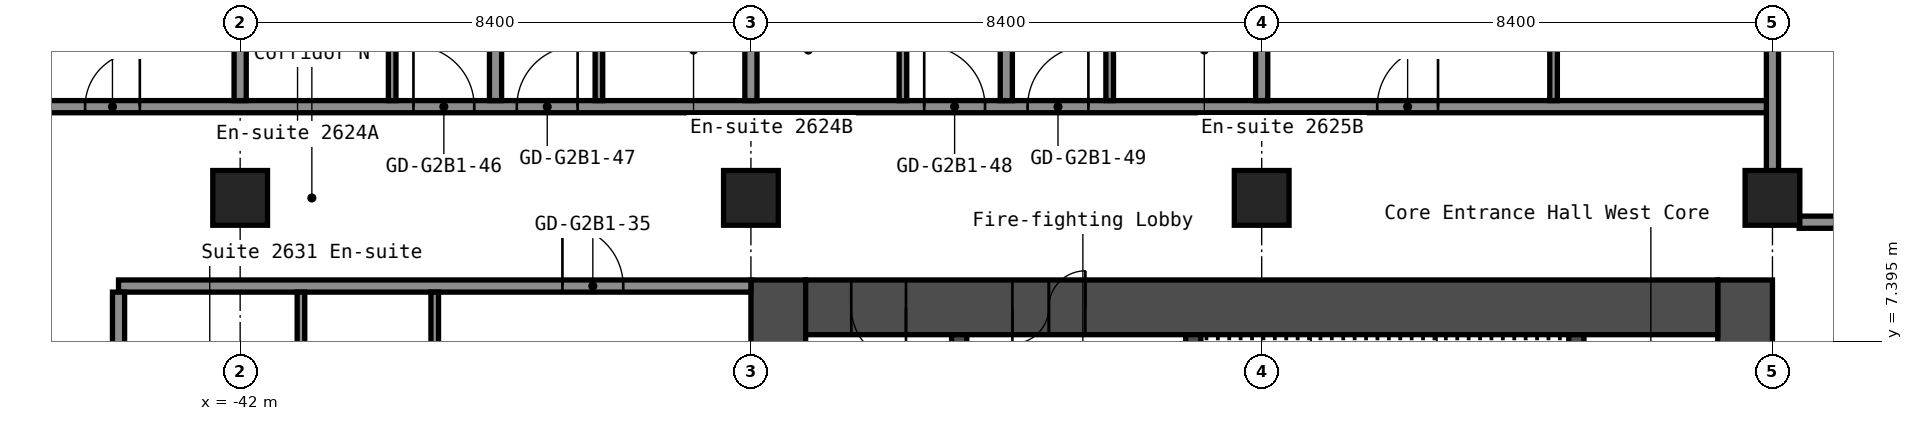
"""IFC4 building model, lengths in metres.
Left out: names, types, materials, properties, quantities, classifications, styles, units other than length and angle.
Written with IfcOpenShell. Run it as: python <this file> out.ifc"""

import sys

from ifc_helpers import new_model, si_unit, direction, frame, frame_2d, origin, origin_2d, place, context, subcontext, project, spatial, rectangle, hollow_rectangle, extrude, element, fill, save


model = new_model("IFC4")
c1 = context("Model", 3, precision=1e-05, world=origin(), true_north=direction((0.0, 1.0)))
c2 = subcontext(c1, "Body", "Model", "MODEL_VIEW")
j1 = project(units=[si_unit("LENGTHUNIT", "METRE"), si_unit("PLANEANGLEUNIT", "RADIAN")], contexts=[c1])
p1 = place(None, origin())
s1 = spatial("IfcSite", under=j1, at=p1, CompositionType="ELEMENT")
p2 = place(p1, origin())
s2 = spatial("IfcBuilding", under=s1, at=p2, CompositionType="ELEMENT")
p3 = place(p2, frame((0.0, 0.0, 94.6)))
s3 = spatial("IfcBuildingStorey", under=s2, at=p3, CompositionType="ELEMENT", Elevation=94.6)
for number, where, z_axis, x_axis in (
    (1, (-42.0, 9.75, 0.0), (0.0, 0.0, 1.0), (1.0, 0.0, 0.0)),
    (2, (-33.6, 9.75, 0.0), (0.0, 0.0, 1.0), (1.0, 0.0, 0.0)),
    (3, (-25.2, 9.75, 0.0), (0.0, 0.0, 1.0), (1.0, 0.0, 0.0)),
    (4, (-16.8, 9.75, 0.0), (0.0, 0.0, 1.0), (1.0, 0.0, 0.0)),
):
    element("IfcColumn", number, at=place(p3, frame(where, z_axis=z_axis, x_axis=x_axis)), inside=s3, PredefinedType="COLUMN", context=c2, shape_type="SweptSolid", body=[
        extrude(hollow_rectangle(XDim=0.9, YDim=0.9, WallThickness=0.036, at=origin_2d()), origin(), (0.0, 0.0, 1.0), 2.8),
    ])
p4 = place(p3, frame((-17.25, -8.4, 0.0), z_axis=(0.0, 0.0, 1.0), x_axis=(0.0, 1.0, 0.0)))
e5 = element("IfcWall", 5, at=p4, inside=s3, PredefinedType="SHEAR", context=c2, shape_type="SweptSolid", body=[
    extrude(rectangle(XDim=16.8, YDim=0.9, at=frame_2d((8.4, 0.0))), origin(), (0.0, 0.0, 1.0), 2.8),
])
p5 = place(p4, frame((7.6, 0.0, 0.0)))
e6 = element("IfcOpeningElement", 6, at=p5, cuts=e5, PredefinedType="OPENING", context=c2, shape_type="SweptSolid", body=[
    extrude(rectangle(XDim=1.2, YDim=2.1, at=frame_2d((0.6, 1.05))), frame((0.0, 0.46, 0.0), z_axis=(0.0, -1.0, 0.0), x_axis=(1.0, 0.0, 0.0)), (0.0, 0.0, 1.0), 0.92),
])
p6 = place(p3, frame((-33.15, -8.4, 0.0), z_axis=(0.0, 0.0, 1.0), x_axis=(0.0, 1.0, 0.0)))
e7 = element("IfcWall", 7, at=p6, inside=s3, PredefinedType="SHEAR", context=c2, shape_type="SweptSolid", body=[
    extrude(rectangle(XDim=16.8, YDim=0.9, at=frame_2d((8.4, 0.0))), origin(), (0.0, 0.0, 1.0), 2.8),
])
p7 = place(p3, frame((-32.7, 7.95, 0.0), z_axis=(0.0, 0.0, 1.0), x_axis=(1.0, 0.0, 0.0)))
e8 = element("IfcWall", 8, at=p7, inside=s3, PredefinedType="SHEAR", context=c2, shape_type="SweptSolid", body=[
    extrude(rectangle(XDim=15.0, YDim=0.9, at=frame_2d((7.5, 0.0))), origin(), (0.0, 0.0, 1.0), 2.8),
])
p8 = place(p7, frame((3.4, 0.0, 0.0)))
e9 = element("IfcOpeningElement", 9, at=p8, cuts=e8, PredefinedType="OPENING", context=c2, shape_type="SweptSolid", body=[
    extrude(rectangle(XDim=1.2, YDim=2.1, at=frame_2d((0.6, 1.05))), frame((0.0, 0.46, 0.0), z_axis=(0.0, -1.0, 0.0), x_axis=(1.0, 0.0, 0.0)), (0.0, 0.0, 1.0), 0.92),
])
p9 = place(p7, frame((0.75, 0.0, 0.0)))
e10 = element("IfcOpeningElement", 10, at=p9, cuts=e8, PredefinedType="OPENING", context=c2, shape_type="SweptSolid", body=[
    extrude(rectangle(XDim=0.9, YDim=2.1, at=frame_2d((0.45, 1.05))), frame((0.0, 0.46, 0.0), z_axis=(0.0, -1.0, 0.0), x_axis=(1.0, 0.0, 0.0)), (0.0, 0.0, 1.0), 0.92),
])
p10 = place(p3, frame((-20.025, 1.2, 0.0), z_axis=(0.0, 0.0, 1.0), x_axis=(0.0, 1.0, 0.0)))
e11 = element("IfcWall", 11, at=p10, inside=s3, PredefinedType="SHEAR", context=c2, shape_type="SweptSolid", body=[
    extrude(rectangle(XDim=6.3, YDim=0.25, at=frame_2d((3.15, 0.0))), origin(), (0.0, 0.0, 1.0), 2.8),
])
p11 = place(p3, frame((-26.325, 3.75, 0.0), z_axis=(0.0, 0.0, 1.0), x_axis=(0.0, 1.0, 0.0)))
e12 = element("IfcWall", 12, at=p11, inside=s3, PredefinedType="SHEAR", context=c2, shape_type="SweptSolid", body=[
    extrude(rectangle(XDim=3.75, YDim=0.25, at=frame_2d((1.875, 0.0))), origin(), (0.0, 0.0, 1.0), 2.8),
])
p12 = place(p11, frame((1.25, 0.0, 0.0)))
e13 = element("IfcOpeningElement", 13, at=p12, cuts=e12, PredefinedType="OPENING", context=c2, shape_type="SweptSolid", body=[
    extrude(rectangle(XDim=1.2, YDim=2.1, at=frame_2d((0.6, 1.05))), frame((0.0, 0.135, 0.0), z_axis=(0.0, -1.0, 0.0), x_axis=(1.0, 0.0, 0.0)), (0.0, 0.0, 1.0), 0.27),
])
p13 = place(p3, frame((-30.175, 1.45, 0.0), z_axis=(0.0, 0.0, 1.0), x_axis=(0.0, 1.0, 0.0)))
e14 = element("IfcWall", 14, at=p13, inside=s3, PredefinedType="SHEAR", context=c2, shape_type="SweptSolid", body=[
    extrude(rectangle(XDim=6.05, YDim=0.25, at=frame_2d((3.025, 0.0))), origin(), (0.0, 0.0, 1.0), 2.8),
])
p14 = place(p13, frame((2.625, 0.0, 0.0)))
e15 = element("IfcOpeningElement", 15, at=p14, cuts=e14, PredefinedType="OPENING", context=c2, shape_type="SweptSolid", body=[
    extrude(rectangle(XDim=1.1, YDim=2.1, at=frame_2d((0.55, 1.05))), frame((0.0, 0.135, 0.0), z_axis=(0.0, -1.0, 0.0), x_axis=(1.0, 0.0, 0.0)), (0.0, 0.0, 1.0), 0.27),
])
p15 = place(p3, frame((-44.0, 8.3, 0.0), z_axis=(0.0, 0.0, 1.0), x_axis=(1.0, 0.0, 0.0)))
e16 = element("IfcWall", 16, at=p15, inside=s3, PredefinedType="PARTITIONING", context=c2, shape_type="SweptSolid", body=[
    extrude(rectangle(XDim=10.4, YDim=0.2, at=frame_2d((5.2, 0.0))), origin(), (0.0, 0.0, 1.0), 2.8),
])
p16 = place(p15, frame((7.3, 0.0, 0.0)))
e17 = element("IfcOpeningElement", 17, at=p16, cuts=e16, PredefinedType="OPENING", context=c2, shape_type="SweptSolid", body=[
    extrude(rectangle(XDim=1.0, YDim=2.1, at=frame_2d((0.5, 1.05))), frame((0.0, 0.11, 0.0), z_axis=(0.0, -1.0, 0.0), x_axis=(1.0, 0.0, 0.0)), (0.0, 0.0, 1.0), 0.22),
])
p17 = place(p3, frame((-16.36, 9.35, 0.0), z_axis=(0.0, 0.0, 1.0), x_axis=(1.0, 0.0, 0.0)))
e18 = element("IfcWall", 18, at=p17, inside=s3, PredefinedType="PARTITIONING", context=c2, shape_type="SweptSolid", body=[
    extrude(rectangle(XDim=32.72, YDim=0.2, at=frame_2d((16.36, 0.0))), origin(), (0.0, 0.0, 1.0), 2.8),
])
p18 = place(p17, frame((1.8, 0.0, 0.0)))
e19 = element("IfcOpeningElement", 19, at=p18, cuts=e18, PredefinedType="OPENING", context=c2, shape_type="SweptSolid", body=[
    extrude(rectangle(XDim=0.9, YDim=2.1, at=frame_2d((0.45, 1.05))), frame((0.0, 0.11, 0.0), z_axis=(0.0, -1.0, 0.0), x_axis=(1.0, 0.0, 0.0)), (0.0, 0.0, 1.0), 0.22),
])
p19 = place(p17, frame((6.0, 0.0, 0.0)))
e20 = element("IfcOpeningElement", 20, at=p19, cuts=e18, PredefinedType="OPENING", context=c2, shape_type="SweptSolid", body=[
    extrude(rectangle(XDim=0.9, YDim=2.1, at=frame_2d((0.45, 1.05))), frame((0.0, 0.11, 0.0), z_axis=(0.0, -1.0, 0.0), x_axis=(1.0, 0.0, 0.0)), (0.0, 0.0, 1.0), 0.22),
])
p20 = place(p17, frame((9.275, 0.0, 0.0)))
e21 = element("IfcOpeningElement", 21, at=p20, cuts=e18, PredefinedType="OPENING", context=c2, shape_type="SweptSolid", body=[
    extrude(rectangle(XDim=0.9, YDim=2.1, at=frame_2d((0.45, 1.05))), frame((0.0, 0.11, 0.0), z_axis=(0.0, -1.0, 0.0), x_axis=(1.0, 0.0, 0.0)), (0.0, 0.0, 1.0), 0.22),
])
p21 = place(p17, frame((13.475, 0.0, 0.0)))
e22 = element("IfcOpeningElement", 22, at=p21, cuts=e18, PredefinedType="OPENING", context=c2, shape_type="SweptSolid", body=[
    extrude(rectangle(XDim=0.9, YDim=2.1, at=frame_2d((0.45, 1.05))), frame((0.0, 0.11, 0.0), z_axis=(0.0, -1.0, 0.0), x_axis=(1.0, 0.0, 0.0)), (0.0, 0.0, 1.0), 0.22),
])
p22 = place(p17, frame((19.21, 0.0, 0.0)))
e23 = element("IfcOpeningElement", 23, at=p22, cuts=e18, PredefinedType="OPENING", context=c2, shape_type="SweptSolid", body=[
    extrude(rectangle(XDim=1.0, YDim=2.1, at=frame_2d((0.5, 1.05))), frame((0.0, 0.11, 0.0), z_axis=(0.0, -1.0, 0.0), x_axis=(1.0, 0.0, 0.0)), (0.0, 0.0, 1.0), 0.22),
])
p23 = place(p17, frame((20.91, 0.0, 0.0)))
e24 = element("IfcOpeningElement", 24, at=p23, cuts=e18, PredefinedType="OPENING", context=c2, shape_type="SweptSolid", body=[
    extrude(rectangle(XDim=1.0, YDim=2.1, at=frame_2d((0.5, 1.05))), frame((0.0, 0.11, 0.0), z_axis=(0.0, -1.0, 0.0), x_axis=(1.0, 0.0, 0.0)), (0.0, 0.0, 1.0), 0.22),
])
p24 = place(p17, frame((27.61, 0.0, 0.0)))
e25 = element("IfcOpeningElement", 25, at=p24, cuts=e18, PredefinedType="OPENING", context=c2, shape_type="SweptSolid", body=[
    extrude(rectangle(XDim=1.0, YDim=2.1, at=frame_2d((0.5, 1.05))), frame((0.0, 0.11, 0.0), z_axis=(0.0, -1.0, 0.0), x_axis=(1.0, 0.0, 0.0)), (0.0, 0.0, 1.0), 0.22),
])
p25 = place(p17, frame((29.31, 0.0, 0.0)))
e26 = element("IfcOpeningElement", 26, at=p25, cuts=e18, PredefinedType="OPENING", context=c2, shape_type="SweptSolid", body=[
    extrude(rectangle(XDim=1.0, YDim=2.1, at=frame_2d((0.5, 1.05))), frame((0.0, 0.11, 0.0), z_axis=(0.0, -1.0, 0.0), x_axis=(1.0, 0.0, 0.0)), (0.0, 0.0, 1.0), 0.22),
])
p26 = place(p3, frame((-46.5, 11.25, 0.0), z_axis=(0.0, 0.0, 1.0), x_axis=(1.0, 0.0, 0.0)))
e27 = element("IfcWall", 27, at=p26, inside=s3, PredefinedType="PARTITIONING", context=c2, shape_type="SweptSolid", body=[
    extrude(rectangle(XDim=29.7, YDim=0.2, at=frame_2d((14.85, 0.0))), origin(), (0.0, 0.0, 1.0), 2.8),
])
p27 = place(p26, frame((1.95, 0.0, 0.0)))
e28 = element("IfcOpeningElement", 28, at=p27, cuts=e27, PredefinedType="OPENING", context=c2, shape_type="SweptSolid", body=[
    extrude(rectangle(XDim=0.9, YDim=2.1, at=frame_2d((0.45, 1.05))), frame((0.0, 0.11, 0.0), z_axis=(0.0, -1.0, 0.0), x_axis=(1.0, 0.0, 0.0)), (0.0, 0.0, 1.0), 0.22),
])
p28 = place(p26, frame((7.35, 0.0, 0.0)))
e29 = element("IfcOpeningElement", 29, at=p28, cuts=e27, PredefinedType="OPENING", context=c2, shape_type="SweptSolid", body=[
    extrude(rectangle(XDim=1.0, YDim=2.1, at=frame_2d((0.5, 1.05))), frame((0.0, 0.11, 0.0), z_axis=(0.0, -1.0, 0.0), x_axis=(1.0, 0.0, 0.0)), (0.0, 0.0, 1.0), 0.22),
])
p29 = place(p26, frame((9.05, 0.0, 0.0)))
e30 = element("IfcOpeningElement", 30, at=p29, cuts=e27, PredefinedType="OPENING", context=c2, shape_type="SweptSolid", body=[
    extrude(rectangle(XDim=1.0, YDim=2.1, at=frame_2d((0.5, 1.05))), frame((0.0, 0.11, 0.0), z_axis=(0.0, -1.0, 0.0), x_axis=(1.0, 0.0, 0.0)), (0.0, 0.0, 1.0), 0.22),
])
p30 = place(p26, frame((15.75, 0.0, 0.0)))
e31 = element("IfcOpeningElement", 31, at=p30, cuts=e27, PredefinedType="OPENING", context=c2, shape_type="SweptSolid", body=[
    extrude(rectangle(XDim=1.0, YDim=2.1, at=frame_2d((0.5, 1.05))), frame((0.0, 0.11, 0.0), z_axis=(0.0, -1.0, 0.0), x_axis=(1.0, 0.0, 0.0)), (0.0, 0.0, 1.0), 0.22),
])
p31 = place(p26, frame((17.45, 0.0, 0.0)))
e32 = element("IfcOpeningElement", 32, at=p31, cuts=e27, PredefinedType="OPENING", context=c2, shape_type="SweptSolid", body=[
    extrude(rectangle(XDim=1.0, YDim=2.1, at=frame_2d((0.5, 1.05))), frame((0.0, 0.11, 0.0), z_axis=(0.0, -1.0, 0.0), x_axis=(1.0, 0.0, 0.0)), (0.0, 0.0, 1.0), 0.22),
])
p32 = place(p26, frame((23.2, 0.0, 0.0)))
e33 = element("IfcOpeningElement", 33, at=p32, cuts=e27, PredefinedType="OPENING", context=c2, shape_type="SweptSolid", body=[
    extrude(rectangle(XDim=1.0, YDim=2.1, at=frame_2d((0.5, 1.05))), frame((0.0, 0.11, 0.0), z_axis=(0.0, -1.0, 0.0), x_axis=(1.0, 0.0, 0.0)), (0.0, 0.0, 1.0), 0.22),
])
p33 = place(p3, frame((-44.0, -8.2, 0.0), z_axis=(0.0, 0.0, 1.0), x_axis=(0.0, 1.0, 0.0)))
e34 = element("IfcWall", 34, at=p33, inside=s3, PredefinedType="PARTITIONING", context=c2, shape_type="SweptSolid", body=[
    extrude(rectangle(XDim=16.4, YDim=0.2, at=frame_2d((8.2, 0.0))), origin(), (0.0, 0.0, 1.0), 2.8),
])
p34 = place(p3, frame((-42.0, 11.35, 0.0), z_axis=(0.0, 0.0, 1.0), x_axis=(0.0, 1.0, 0.0)))
e35 = element("IfcWall", 35, at=p34, inside=s3, PredefinedType="PARTITIONING", context=c2, shape_type="SweptSolid", body=[
    extrude(rectangle(XDim=12.2, YDim=0.2, at=frame_2d((6.1, 0.0))), origin(), (0.0, 0.0, 1.0), 2.8),
])
p35 = place(p3, frame((-41.0, 5.1, 0.0), z_axis=(0.0, 0.0, 1.0), x_axis=(0.0, 1.0, 0.0)))
e36 = element("IfcWall", 36, at=p35, inside=s3, PredefinedType="PARTITIONING", context=c2, shape_type="SweptSolid", body=[
    extrude(rectangle(XDim=3.1, YDim=0.125, at=frame_2d((1.55, 0.0))), origin(), (0.0, 0.0, 1.0), 2.8),
])
p36 = place(p3, frame((-39.5, 11.35, 0.0), z_axis=(0.0, 0.0, 1.0), x_axis=(0.0, 1.0, 0.0)))
e37 = element("IfcWall", 37, at=p36, inside=s3, PredefinedType="PARTITIONING", context=c2, shape_type="SweptSolid", body=[
    extrude(rectangle(XDim=2.9, YDim=0.125, at=frame_2d((1.45, 0.0))), origin(), (0.0, 0.0, 1.0), 2.8),
])
p37 = place(p36, frame((1.5, 0.0, 0.0)))
e38 = element("IfcOpeningElement", 38, at=p37, cuts=e37, PredefinedType="OPENING", context=c2, shape_type="SweptSolid", body=[
    extrude(rectangle(XDim=0.8, YDim=2.1, at=frame_2d((0.4, 1.05))), frame((0.0, 0.073, 0.0), z_axis=(0.0, -1.0, 0.0), x_axis=(1.0, 0.0, 0.0)), (0.0, 0.0, 1.0), 0.145),
])
p38 = place(p3, frame((-38.8, 0.1, 0.0), z_axis=(0.0, 0.0, 1.0), x_axis=(0.0, 1.0, 0.0)))
e39 = element("IfcWall", 39, at=p38, inside=s3, PredefinedType="PARTITIONING", context=c2, shape_type="SweptSolid", body=[
    extrude(rectangle(XDim=8.1, YDim=0.125, at=frame_2d((4.05, 0.0))), origin(), (0.0, 0.0, 1.0), 2.8),
])
p39 = place(p38, frame((3.15, 0.0, 0.0)))
e40 = element("IfcOpeningElement", 40, at=p39, cuts=e39, PredefinedType="OPENING", context=c2, shape_type="SweptSolid", body=[
    extrude(rectangle(XDim=0.9, YDim=2.1, at=frame_2d((0.45, 1.05))), frame((0.0, 0.073, 0.0), z_axis=(0.0, -1.0, 0.0), x_axis=(1.0, 0.0, 0.0)), (0.0, 0.0, 1.0), 0.145),
])
p40 = place(p3, frame((-37.8, 11.35, 0.0), z_axis=(0.0, 0.0, 1.0), x_axis=(0.0, 1.0, 0.0)))
e41 = element("IfcWall", 41, at=p40, inside=s3, PredefinedType="PARTITIONING", context=c2, shape_type="SweptSolid", body=[
    extrude(rectangle(XDim=12.2, YDim=0.2, at=frame_2d((6.1, 0.0))), origin(), (0.0, 0.0, 1.0), 2.8),
])
p41 = place(p3, frame((-36.1, 11.35, 0.0), z_axis=(0.0, 0.0, 1.0), x_axis=(0.0, 1.0, 0.0)))
e42 = element("IfcWall", 42, at=p41, inside=s3, PredefinedType="PARTITIONING", context=c2, shape_type="SweptSolid", body=[
    extrude(rectangle(XDim=2.9, YDim=0.125, at=frame_2d((1.45, 0.0))), origin(), (0.0, 0.0, 1.0), 2.8),
])
p42 = place(p41, frame((1.5, 0.0, 0.0)))
e43 = element("IfcOpeningElement", 43, at=p42, cuts=e42, PredefinedType="OPENING", context=c2, shape_type="SweptSolid", body=[
    extrude(rectangle(XDim=0.8, YDim=2.1, at=frame_2d((0.4, 1.05))), frame((0.0, 0.073, 0.0), z_axis=(0.0, -1.0, 0.0), x_axis=(1.0, 0.0, 0.0)), (0.0, 0.0, 1.0), 0.145),
])
p43 = place(p3, frame((-33.6, 11.35, 0.0), z_axis=(0.0, 0.0, 1.0), x_axis=(0.0, 1.0, 0.0)))
e44 = element("IfcWall", 44, at=p43, inside=s3, PredefinedType="PARTITIONING", context=c2, shape_type="SweptSolid", body=[
    extrude(rectangle(XDim=12.2, YDim=0.2, at=frame_2d((6.1, 0.0))), origin(), (0.0, 0.0, 1.0), 2.8),
])
p44 = place(p3, frame((-31.1, 11.35, 0.0), z_axis=(0.0, 0.0, 1.0), x_axis=(0.0, 1.0, 0.0)))
e45 = element("IfcWall", 45, at=p44, inside=s3, PredefinedType="PARTITIONING", context=c2, shape_type="SweptSolid", body=[
    extrude(rectangle(XDim=2.9, YDim=0.125, at=frame_2d((1.45, 0.0))), origin(), (0.0, 0.0, 1.0), 2.8),
])
p45 = place(p44, frame((1.5, 0.0, 0.0)))
e46 = element("IfcOpeningElement", 46, at=p45, cuts=e45, PredefinedType="OPENING", context=c2, shape_type="SweptSolid", body=[
    extrude(rectangle(XDim=0.8, YDim=2.1, at=frame_2d((0.4, 1.05))), frame((0.0, 0.073, 0.0), z_axis=(0.0, -1.0, 0.0), x_axis=(1.0, 0.0, 0.0)), (0.0, 0.0, 1.0), 0.145),
])
p46 = place(p3, frame((-29.4, 11.35, 0.0), z_axis=(0.0, 0.0, 1.0), x_axis=(0.0, 1.0, 0.0)))
e47 = element("IfcWall", 47, at=p46, inside=s3, PredefinedType="PARTITIONING", context=c2, shape_type="SweptSolid", body=[
    extrude(rectangle(XDim=12.2, YDim=0.2, at=frame_2d((6.1, 0.0))), origin(), (0.0, 0.0, 1.0), 2.8),
])
p47 = place(p3, frame((-27.7, 11.35, 0.0), z_axis=(0.0, 0.0, 1.0), x_axis=(0.0, 1.0, 0.0)))
e48 = element("IfcWall", 48, at=p47, inside=s3, PredefinedType="PARTITIONING", context=c2, shape_type="SweptSolid", body=[
    extrude(rectangle(XDim=2.9, YDim=0.125, at=frame_2d((1.45, 0.0))), origin(), (0.0, 0.0, 1.0), 2.8),
])
p48 = place(p47, frame((1.5, 0.0, 0.0)))
e49 = element("IfcOpeningElement", 49, at=p48, cuts=e48, PredefinedType="OPENING", context=c2, shape_type="SweptSolid", body=[
    extrude(rectangle(XDim=0.8, YDim=2.1, at=frame_2d((0.4, 1.05))), frame((0.0, 0.073, 0.0), z_axis=(0.0, -1.0, 0.0), x_axis=(1.0, 0.0, 0.0)), (0.0, 0.0, 1.0), 0.145),
])
p49 = place(p3, frame((-25.2, 11.35, 0.0), z_axis=(0.0, 0.0, 1.0), x_axis=(0.0, 1.0, 0.0)))
e50 = element("IfcWall", 50, at=p49, inside=s3, PredefinedType="PARTITIONING", context=c2, shape_type="SweptSolid", body=[
    extrude(rectangle(XDim=12.2, YDim=0.2, at=frame_2d((6.1, 0.0))), origin(), (0.0, 0.0, 1.0), 2.8),
])
p50 = place(p3, frame((-20.4, 11.35, 0.0), z_axis=(0.0, 0.0, 1.0), x_axis=(0.0, 1.0, 0.0)))
e51 = element("IfcWall", 51, at=p50, inside=s3, PredefinedType="PARTITIONING", context=c2, shape_type="SweptSolid", body=[
    extrude(rectangle(XDim=3.3, YDim=0.125, at=frame_2d((1.65, 0.0))), origin(), (0.0, 0.0, 1.0), 2.8),
])
p51 = place(p50, frame((1.1, 0.0, 0.0)))
e52 = element("IfcOpeningElement", 52, at=p51, cuts=e51, PredefinedType="OPENING", context=c2, shape_type="SweptSolid", body=[
    extrude(rectangle(XDim=1.0, YDim=2.1, at=frame_2d((0.5, 1.05))), frame((0.0, 0.073, 0.0), z_axis=(0.0, -1.0, 0.0), x_axis=(1.0, 0.0, 0.0)), (0.0, 0.0, 1.0), 0.145),
])
p52 = place(p3, frame((-16.8, 10.19, 0.0), z_axis=(0.0, 0.0, 1.0), x_axis=(0.0, 1.0, 0.0)))
e53 = element("IfcWall", 53, at=p52, inside=s3, PredefinedType="PARTITIONING", context=c2, shape_type="SweptSolid", body=[
    extrude(rectangle(XDim=13.36, YDim=0.2, at=frame_2d((6.68, 0.0))), origin(), (0.0, 0.0, 1.0), 2.8),
])
p53 = place(p8, origin())
e54 = element("IfcDoor", 54, at=p53, inside=s3, OperationType="DOUBLE_DOOR_SINGLE_SWING", PredefinedType="DOOR", context=c2, shape_type="SweptSolid", body=[
    extrude(rectangle(XDim=1.2, YDim=2.1, at=frame_2d((0.6, 1.05))), frame((0.0, 0.025, 0.0), z_axis=(0.0, -1.0, 0.0), x_axis=(1.0, 0.0, 0.0)), (0.0, 0.0, 1.0), 0.05),
])
fill(e9, e54)
p54 = place(p9, origin())
e55 = element("IfcDoor", 55, at=p54, inside=s3, OperationType="SINGLE_SWING_RIGHT", PredefinedType="DOOR", context=c2, shape_type="SweptSolid", body=[
    extrude(rectangle(XDim=0.9, YDim=2.1, at=frame_2d((0.45, 1.05))), frame((0.0, 0.025, 0.0), z_axis=(0.0, -1.0, 0.0), x_axis=(1.0, 0.0, 0.0)), (0.0, 0.0, 1.0), 0.05),
])
fill(e10, e55)
p55 = place(p16, origin())
e56 = element("IfcDoor", 56, at=p55, inside=s3, OperationType="SINGLE_SWING_RIGHT", PredefinedType="DOOR", context=c2, shape_type="SweptSolid", body=[
    extrude(rectangle(XDim=1.0, YDim=2.1, at=frame_2d((0.5, 1.05))), frame((0.0, 0.025, 0.0), z_axis=(0.0, -1.0, 0.0), x_axis=(1.0, 0.0, 0.0)), (0.0, 0.0, 1.0), 0.05),
])
fill(e17, e56)
p56 = place(p27, origin())
e57 = element("IfcDoor", 57, at=p56, inside=s3, OperationType="SINGLE_SWING_LEFT", PredefinedType="DOOR", context=c2, shape_type="SweptSolid", body=[
    extrude(rectangle(XDim=0.9, YDim=2.1, at=frame_2d((0.45, 1.05))), frame((0.0, 0.025, 0.0), z_axis=(0.0, -1.0, 0.0), x_axis=(1.0, 0.0, 0.0)), (0.0, 0.0, 1.0), 0.05),
])
fill(e28, e57)
p57 = place(p28, origin())
e58 = element("IfcDoor", 58, at=p57, inside=s3, OperationType="SINGLE_SWING_RIGHT", PredefinedType="DOOR", context=c2, shape_type="SweptSolid", body=[
    extrude(rectangle(XDim=1.0, YDim=2.1, at=frame_2d((0.5, 1.05))), frame((0.0, 0.025, 0.0), z_axis=(0.0, -1.0, 0.0), x_axis=(1.0, 0.0, 0.0)), (0.0, 0.0, 1.0), 0.05),
])
fill(e29, e58)
p58 = place(p29, origin())
e59 = element("IfcDoor", 59, at=p58, inside=s3, OperationType="SINGLE_SWING_LEFT", PredefinedType="DOOR", context=c2, shape_type="SweptSolid", body=[
    extrude(rectangle(XDim=1.0, YDim=2.1, at=frame_2d((0.5, 1.05))), frame((0.0, 0.025, 0.0), z_axis=(0.0, -1.0, 0.0), x_axis=(1.0, 0.0, 0.0)), (0.0, 0.0, 1.0), 0.05),
])
fill(e30, e59)
p59 = place(p30, origin())
e60 = element("IfcDoor", 60, at=p59, inside=s3, OperationType="SINGLE_SWING_RIGHT", PredefinedType="DOOR", context=c2, shape_type="SweptSolid", body=[
    extrude(rectangle(XDim=1.0, YDim=2.1, at=frame_2d((0.5, 1.05))), frame((0.0, 0.025, 0.0), z_axis=(0.0, -1.0, 0.0), x_axis=(1.0, 0.0, 0.0)), (0.0, 0.0, 1.0), 0.05),
])
fill(e31, e60)
p60 = place(p31, origin())
e61 = element("IfcDoor", 61, at=p60, inside=s3, OperationType="SINGLE_SWING_LEFT", PredefinedType="DOOR", context=c2, shape_type="SweptSolid", body=[
    extrude(rectangle(XDim=1.0, YDim=2.1, at=frame_2d((0.5, 1.05))), frame((0.0, 0.025, 0.0), z_axis=(0.0, -1.0, 0.0), x_axis=(1.0, 0.0, 0.0)), (0.0, 0.0, 1.0), 0.05),
])
fill(e32, e61)
p61 = place(p32, origin())
e62 = element("IfcDoor", 62, at=p61, inside=s3, OperationType="SINGLE_SWING_LEFT", PredefinedType="DOOR", context=c2, shape_type="SweptSolid", body=[
    extrude(rectangle(XDim=1.0, YDim=2.1, at=frame_2d((0.5, 1.05))), frame((0.0, 0.025, 0.0), z_axis=(0.0, -1.0, 0.0), x_axis=(1.0, 0.0, 0.0)), (0.0, 0.0, 1.0), 0.05),
])
fill(e33, e62)
save(model, sys.argv[1])
